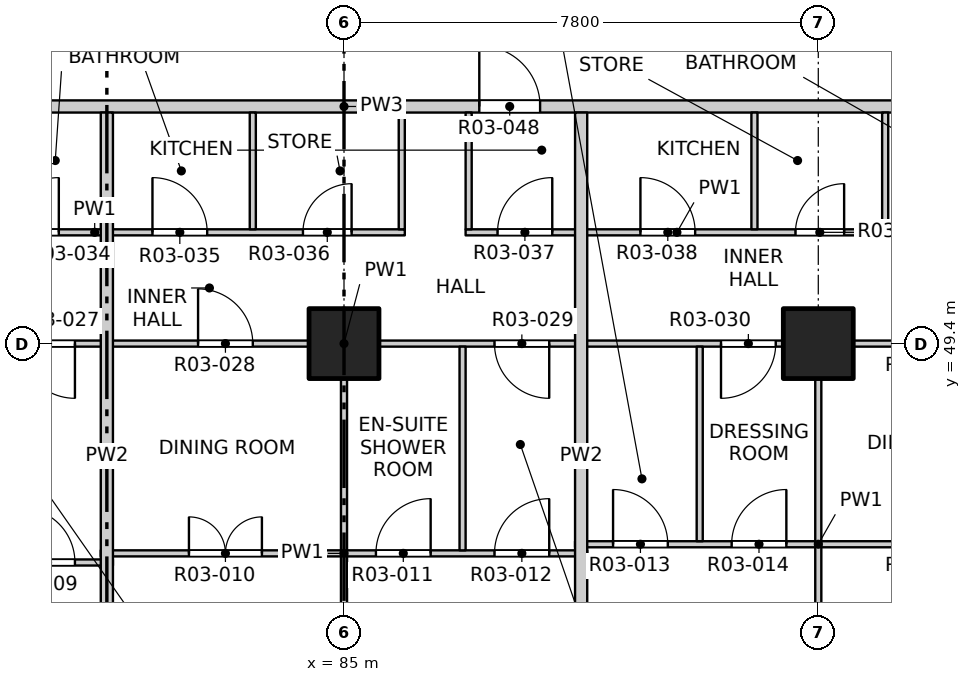
"""IFC4 building model, lengths in metres.
Left out: names, types, materials, properties, quantities, classifications, styles, units other than length and angle.
Written with IfcOpenShell. Run it as: python <this file> out.ifc"""

import sys

from ifc_helpers import new_model, si_unit, direction, frame, frame_2d, origin, origin_2d, place, context, subcontext, project, spatial, rectangle, extrude, element, fill, save


model = new_model("IFC4")
c1 = context("Model", 3, precision=1e-05, world=origin(), true_north=direction((0.0, 1.0)))
c2 = subcontext(c1, "Body", "Model", "MODEL_VIEW")
j1 = project(units=[si_unit("LENGTHUNIT", "METRE"), si_unit("PLANEANGLEUNIT", "RADIAN")], contexts=[c1])
p1 = place(None, origin())
s1 = spatial("IfcSite", under=j1, at=p1, CompositionType="ELEMENT")
p2 = place(p1, origin())
s2 = spatial("IfcBuilding", under=s1, at=p2, CompositionType="ELEMENT")
p3 = place(p2, frame((0.0, 0.0, 39.9)))
s3 = spatial("IfcBuildingStorey", under=s2, at=p3, CompositionType="ELEMENT", Elevation=39.9)
for number, where, z_axis, x_axis in (
    (1, (85.0, 49.4, -0.25), (0.0, 0.0, 1.0), (1.0, 0.0, 0.0)),
    (2, (92.8, 49.4, -0.25), (0.0, 0.0, 1.0), (1.0, 0.0, 0.0)),
):
    element("IfcColumn", number, at=place(p3, frame(where, z_axis=z_axis, x_axis=x_axis)), inside=s3, PredefinedType="COLUMN", context=c2, shape_type="SweptSolid", body=[
        extrude(rectangle(XDim=1.15, YDim=1.15, at=origin_2d()), origin(), (0.0, 0.0, 1.0), 3.4),
    ])
p4 = place(p3, frame((73.2, 45.8, 0.0), z_axis=(0.0, 0.0, 1.0), x_axis=(1.0, 0.0, 0.0)))
e3 = element("IfcWall", 3, at=p4, inside=s3, PredefinedType="PARTITIONING", context=c2, shape_type="SweptSolid", body=[
    extrude(rectangle(XDim=8.0, YDim=0.1, at=frame_2d((4.0, 0.0))), origin(), (0.0, 0.0, 1.0), 3.15),
])
p5 = place(p4, frame((1.45, 0.0, 0.0)))
e4 = element("IfcOpeningElement", 4, at=p5, cuts=e3, PredefinedType="OPENING", context=c2, shape_type="SweptSolid", body=[
    extrude(rectangle(XDim=1.2, YDim=2.1, at=frame_2d((0.6, 1.05))), frame((0.0, 0.06, 0.0), z_axis=(0.0, -1.0, 0.0), x_axis=(1.0, 0.0, 0.0)), (0.0, 0.0, 1.0), 0.12),
])
p6 = place(p4, frame((4.525, 0.0, 0.0)))
e5 = element("IfcOpeningElement", 5, at=p6, cuts=e3, PredefinedType="OPENING", context=c2, shape_type="SweptSolid", body=[
    extrude(rectangle(XDim=0.9, YDim=2.1, at=frame_2d((0.45, 1.05))), frame((0.0, 0.06, 0.0), z_axis=(0.0, -1.0, 0.0), x_axis=(1.0, 0.0, 0.0)), (0.0, 0.0, 1.0), 0.12),
])
p7 = place(p4, frame((6.475, 0.0, 0.0)))
e6 = element("IfcOpeningElement", 6, at=p7, cuts=e3, PredefinedType="OPENING", context=c2, shape_type="SweptSolid", body=[
    extrude(rectangle(XDim=0.9, YDim=2.1, at=frame_2d((0.45, 1.05))), frame((0.0, 0.06, 0.0), z_axis=(0.0, -1.0, 0.0), x_axis=(1.0, 0.0, 0.0)), (0.0, 0.0, 1.0), 0.12),
])
p8 = place(p3, frame((81.0, 45.95, 0.0), z_axis=(0.0, 0.0, 1.0), x_axis=(1.0, 0.0, 0.0)))
e7 = element("IfcWall", 7, at=p8, inside=s3, PredefinedType="PARTITIONING", context=c2, shape_type="SweptSolid", body=[
    extrude(rectangle(XDim=8.0, YDim=0.1, at=frame_2d((4.0, 0.0))), origin(), (0.0, 0.0, 1.0), 3.15),
])
p9 = place(p8, frame((1.45, 0.0, 0.0)))
e8 = element("IfcOpeningElement", 8, at=p9, cuts=e7, PredefinedType="OPENING", context=c2, shape_type="SweptSolid", body=[
    extrude(rectangle(XDim=1.2, YDim=2.1, at=frame_2d((0.6, 1.05))), frame((0.0, 0.06, 0.0), z_axis=(0.0, -1.0, 0.0), x_axis=(1.0, 0.0, 0.0)), (0.0, 0.0, 1.0), 0.12),
])
p10 = place(p8, frame((4.525, 0.0, 0.0)))
e9 = element("IfcOpeningElement", 9, at=p10, cuts=e7, PredefinedType="OPENING", context=c2, shape_type="SweptSolid", body=[
    extrude(rectangle(XDim=0.9, YDim=2.1, at=frame_2d((0.45, 1.05))), frame((0.0, 0.06, 0.0), z_axis=(0.0, -1.0, 0.0), x_axis=(1.0, 0.0, 0.0)), (0.0, 0.0, 1.0), 0.12),
])
p11 = place(p8, frame((6.475, 0.0, 0.0)))
e10 = element("IfcOpeningElement", 10, at=p11, cuts=e7, PredefinedType="OPENING", context=c2, shape_type="SweptSolid", body=[
    extrude(rectangle(XDim=0.9, YDim=2.1, at=frame_2d((0.45, 1.05))), frame((0.0, 0.06, 0.0), z_axis=(0.0, -1.0, 0.0), x_axis=(1.0, 0.0, 0.0)), (0.0, 0.0, 1.0), 0.12),
])
p12 = place(p3, frame((88.8, 46.1, 0.0), z_axis=(0.0, 0.0, 1.0), x_axis=(1.0, 0.0, 0.0)))
e11 = element("IfcWall", 11, at=p12, inside=s3, PredefinedType="PARTITIONING", context=c2, shape_type="SweptSolid", body=[
    extrude(rectangle(XDim=8.0, YDim=0.1, at=frame_2d((4.0, 0.0))), origin(), (0.0, 0.0, 1.0), 3.15),
])
p13 = place(p12, frame((0.625, 0.0, 0.0)))
e12 = element("IfcOpeningElement", 12, at=p13, cuts=e11, PredefinedType="OPENING", context=c2, shape_type="SweptSolid", body=[
    extrude(rectangle(XDim=0.9, YDim=2.1, at=frame_2d((0.45, 1.05))), frame((0.0, 0.06, 0.0), z_axis=(0.0, -1.0, 0.0), x_axis=(1.0, 0.0, 0.0)), (0.0, 0.0, 1.0), 0.12),
])
p14 = place(p12, frame((2.575, 0.0, 0.0)))
e13 = element("IfcOpeningElement", 13, at=p14, cuts=e11, PredefinedType="OPENING", context=c2, shape_type="SweptSolid", body=[
    extrude(rectangle(XDim=0.9, YDim=2.1, at=frame_2d((0.45, 1.05))), frame((0.0, 0.06, 0.0), z_axis=(0.0, -1.0, 0.0), x_axis=(1.0, 0.0, 0.0)), (0.0, 0.0, 1.0), 0.12),
])
p15 = place(p12, frame((5.35, 0.0, 0.0)))
e14 = element("IfcOpeningElement", 14, at=p15, cuts=e11, PredefinedType="OPENING", context=c2, shape_type="SweptSolid", body=[
    extrude(rectangle(XDim=1.2, YDim=2.1, at=frame_2d((0.6, 1.05))), frame((0.0, 0.06, 0.0), z_axis=(0.0, -1.0, 0.0), x_axis=(1.0, 0.0, 0.0)), (0.0, 0.0, 1.0), 0.12),
])
p16 = place(p3, frame((73.2, 49.4, 0.0), z_axis=(0.0, 0.0, 1.0), x_axis=(1.0, 0.0, 0.0)))
e15 = element("IfcWall", 15, at=p16, inside=s3, PredefinedType="PARTITIONING", context=c2, shape_type="SweptSolid", body=[
    extrude(rectangle(XDim=23.6, YDim=0.1, at=frame_2d((11.8, 0.0))), origin(), (0.0, 0.0, 1.0), 3.15),
])
p17 = place(p16, frame((1.6, 0.0, 0.0)))
e16 = element("IfcOpeningElement", 16, at=p17, cuts=e15, PredefinedType="OPENING", context=c2, shape_type="SweptSolid", body=[
    extrude(rectangle(XDim=0.9, YDim=2.1, at=frame_2d((0.45, 1.05))), frame((0.0, 0.06, 0.0), z_axis=(0.0, -1.0, 0.0), x_axis=(1.0, 0.0, 0.0)), (0.0, 0.0, 1.0), 0.12),
])
p18 = place(p16, frame((6.475, 0.0, 0.0)))
e17 = element("IfcOpeningElement", 17, at=p18, cuts=e15, PredefinedType="OPENING", context=c2, shape_type="SweptSolid", body=[
    extrude(rectangle(XDim=0.9, YDim=2.1, at=frame_2d((0.45, 1.05))), frame((0.0, 0.06, 0.0), z_axis=(0.0, -1.0, 0.0), x_axis=(1.0, 0.0, 0.0)), (0.0, 0.0, 1.0), 0.12),
])
p19 = place(p16, frame((9.4, 0.0, 0.0)))
e18 = element("IfcOpeningElement", 18, at=p19, cuts=e15, PredefinedType="OPENING", context=c2, shape_type="SweptSolid", body=[
    extrude(rectangle(XDim=0.9, YDim=2.1, at=frame_2d((0.45, 1.05))), frame((0.0, 0.06, 0.0), z_axis=(0.0, -1.0, 0.0), x_axis=(1.0, 0.0, 0.0)), (0.0, 0.0, 1.0), 0.12),
])
p20 = place(p16, frame((14.275, 0.0, 0.0)))
e19 = element("IfcOpeningElement", 19, at=p20, cuts=e15, PredefinedType="OPENING", context=c2, shape_type="SweptSolid", body=[
    extrude(rectangle(XDim=0.9, YDim=2.1, at=frame_2d((0.45, 1.05))), frame((0.0, 0.06, 0.0), z_axis=(0.0, -1.0, 0.0), x_axis=(1.0, 0.0, 0.0)), (0.0, 0.0, 1.0), 0.12),
])
p21 = place(p16, frame((18.0, 0.0, 0.0)))
e20 = element("IfcOpeningElement", 20, at=p21, cuts=e15, PredefinedType="OPENING", context=c2, shape_type="SweptSolid", body=[
    extrude(rectangle(XDim=0.9, YDim=2.1, at=frame_2d((0.45, 1.05))), frame((0.0, 0.06, 0.0), z_axis=(0.0, -1.0, 0.0), x_axis=(1.0, 0.0, 0.0)), (0.0, 0.0, 1.0), 0.12),
])
p22 = place(p16, frame((21.1, 0.0, 0.0)))
e21 = element("IfcOpeningElement", 21, at=p22, cuts=e15, PredefinedType="OPENING", context=c2, shape_type="SweptSolid", body=[
    extrude(rectangle(XDim=0.9, YDim=2.1, at=frame_2d((0.45, 1.05))), frame((0.0, 0.06, 0.0), z_axis=(0.0, -1.0, 0.0), x_axis=(1.0, 0.0, 0.0)), (0.0, 0.0, 1.0), 0.12),
])
p23 = place(p3, frame((75.8, 51.23, 0.0), z_axis=(0.0, 0.0, 1.0), x_axis=(1.0, 0.0, 0.0)))
e22 = element("IfcWall", 22, at=p23, inside=s3, PredefinedType="PARTITIONING", context=c2, shape_type="SweptSolid", body=[
    extrude(rectangle(XDim=10.2, YDim=0.1, at=frame_2d((5.1, 0.0))), origin(), (0.0, 0.0, 1.0), 3.15),
])
p24 = place(p23, frame((0.985, 0.0, 0.0)))
e23 = element("IfcOpeningElement", 23, at=p24, cuts=e22, PredefinedType="OPENING", context=c2, shape_type="SweptSolid", body=[
    extrude(rectangle(XDim=0.9, YDim=2.1, at=frame_2d((0.45, 1.05))), frame((0.0, 0.06, 0.0), z_axis=(0.0, -1.0, 0.0), x_axis=(1.0, 0.0, 0.0)), (0.0, 0.0, 1.0), 0.12),
])
p25 = place(p23, frame((3.61, 0.0, 0.0)))
e24 = element("IfcOpeningElement", 24, at=p25, cuts=e22, PredefinedType="OPENING", context=c2, shape_type="SweptSolid", body=[
    extrude(rectangle(XDim=0.9, YDim=2.1, at=frame_2d((0.45, 1.05))), frame((0.0, 0.06, 0.0), z_axis=(0.0, -1.0, 0.0), x_axis=(1.0, 0.0, 0.0)), (0.0, 0.0, 1.0), 0.12),
])
p26 = place(p23, frame((6.05, 0.0, 0.0)))
e25 = element("IfcOpeningElement", 25, at=p26, cuts=e22, PredefinedType="OPENING", context=c2, shape_type="SweptSolid", body=[
    extrude(rectangle(XDim=0.9, YDim=2.1, at=frame_2d((0.45, 1.05))), frame((0.0, 0.06, 0.0), z_axis=(0.0, -1.0, 0.0), x_axis=(1.0, 0.0, 0.0)), (0.0, 0.0, 1.0), 0.12),
])
p27 = place(p23, frame((8.525, 0.0, 0.0)))
e26 = element("IfcOpeningElement", 26, at=p27, cuts=e22, PredefinedType="OPENING", context=c2, shape_type="SweptSolid", body=[
    extrude(rectangle(XDim=0.8, YDim=2.1, at=frame_2d((0.4, 1.05))), frame((0.0, 0.06, 0.0), z_axis=(0.0, -1.0, 0.0), x_axis=(1.0, 0.0, 0.0)), (0.0, 0.0, 1.0), 0.12),
])
p28 = place(p3, frame((87.0, 51.23, 0.0), z_axis=(0.0, 0.0, 1.0), x_axis=(1.0, 0.0, 0.0)))
e27 = element("IfcWall", 27, at=p28, inside=s3, PredefinedType="PARTITIONING", context=c2, shape_type="SweptSolid", body=[
    extrude(rectangle(XDim=6.95, YDim=0.1, at=frame_2d((3.475, 0.0))), origin(), (0.0, 0.0, 1.0), 3.15),
])
p29 = place(p28, frame((0.525, 0.0, 0.0)))
e28 = element("IfcOpeningElement", 28, at=p29, cuts=e27, PredefinedType="OPENING", context=c2, shape_type="SweptSolid", body=[
    extrude(rectangle(XDim=0.9, YDim=2.1, at=frame_2d((0.45, 1.05))), frame((0.0, 0.06, 0.0), z_axis=(0.0, -1.0, 0.0), x_axis=(1.0, 0.0, 0.0)), (0.0, 0.0, 1.0), 0.12),
])
p30 = place(p28, frame((2.875, 0.0, 0.0)))
e29 = element("IfcOpeningElement", 29, at=p30, cuts=e27, PredefinedType="OPENING", context=c2, shape_type="SweptSolid", body=[
    extrude(rectangle(XDim=0.9, YDim=2.1, at=frame_2d((0.45, 1.05))), frame((0.0, 0.06, 0.0), z_axis=(0.0, -1.0, 0.0), x_axis=(1.0, 0.0, 0.0)), (0.0, 0.0, 1.0), 0.12),
])
p31 = place(p28, frame((5.425, 0.0, 0.0)))
e30 = element("IfcOpeningElement", 30, at=p31, cuts=e27, PredefinedType="OPENING", context=c2, shape_type="SweptSolid", body=[
    extrude(rectangle(XDim=0.8, YDim=2.1, at=frame_2d((0.4, 1.05))), frame((0.0, 0.06, 0.0), z_axis=(0.0, -1.0, 0.0), x_axis=(1.0, 0.0, 0.0)), (0.0, 0.0, 1.0), 0.12),
])
p32 = place(p3, frame((73.2, 53.3, 0.0), z_axis=(0.0, 0.0, 1.0), x_axis=(1.0, 0.0, 0.0)))
e31 = element("IfcWall", 31, at=p32, inside=s3, PredefinedType="PARTITIONING", context=c2, shape_type="SweptSolid", body=[
    extrude(rectangle(XDim=23.6, YDim=0.2, at=frame_2d((11.8, 0.0))), origin(), (0.0, 0.0, 1.0), 3.15),
])
p33 = place(p32, frame((2.825, 0.0, 0.0)))
e32 = element("IfcOpeningElement", 32, at=p33, cuts=e31, PredefinedType="OPENING", context=c2, shape_type="SweptSolid", body=[
    extrude(rectangle(XDim=1.0, YDim=2.1, at=frame_2d((0.5, 1.05))), frame((0.0, 0.11, 0.0), z_axis=(0.0, -1.0, 0.0), x_axis=(1.0, 0.0, 0.0)), (0.0, 0.0, 1.0), 0.22),
])
p34 = place(p32, frame((14.025, 0.0, 0.0)))
e33 = element("IfcOpeningElement", 33, at=p34, cuts=e31, PredefinedType="OPENING", context=c2, shape_type="SweptSolid", body=[
    extrude(rectangle(XDim=1.0, YDim=2.1, at=frame_2d((0.5, 1.05))), frame((0.0, 0.11, 0.0), z_axis=(0.0, -1.0, 0.0), x_axis=(1.0, 0.0, 0.0)), (0.0, 0.0, 1.0), 0.22),
])
p35 = place(p32, frame((21.975, 0.0, 0.0)))
e34 = element("IfcOpeningElement", 34, at=p35, cuts=e31, PredefinedType="OPENING", context=c2, shape_type="SweptSolid", body=[
    extrude(rectangle(XDim=1.0, YDim=2.1, at=frame_2d((0.5, 1.05))), frame((0.0, 0.11, 0.0), z_axis=(0.0, -1.0, 0.0), x_axis=(1.0, 0.0, 0.0)), (0.0, 0.0, 1.0), 0.22),
])
p36 = place(p3, frame((81.1, 41.9, 0.0), z_axis=(0.0, 0.0, 1.0), x_axis=(0.0, 1.0, 0.0)))
e35 = element("IfcWall", 35, at=p36, inside=s3, PredefinedType="PARTITIONING", context=c2, shape_type="SweptSolid", body=[
    extrude(rectangle(XDim=11.3, YDim=0.2, at=frame_2d((5.65, 0.0))), origin(), (0.0, 0.0, 1.0), 3.15),
])
p37 = place(p3, frame((83.5, 51.28, 0.0), z_axis=(0.0, 0.0, 1.0), x_axis=(0.0, 1.0, 0.0)))
e36 = element("IfcWall", 36, at=p37, inside=s3, PredefinedType="PARTITIONING", context=c2, shape_type="SweptSolid", body=[
    extrude(rectangle(XDim=1.92, YDim=0.1, at=frame_2d((0.96, 0.0))), origin(), (0.0, 0.0, 1.0), 3.15),
])
p38 = place(p3, frame((85.0, 41.9, 0.0), z_axis=(0.0, 0.0, 1.0), x_axis=(0.0, 1.0, 0.0)))
e37 = element("IfcWall", 37, at=p38, inside=s3, PredefinedType="PARTITIONING", context=c2, shape_type="SweptSolid", body=[
    extrude(rectangle(XDim=7.45, YDim=0.1, at=frame_2d((3.725, 0.0))), origin(), (0.0, 0.0, 1.0), 2.55),
])
p39 = place(p3, frame((85.95, 51.28, 0.0), z_axis=(0.0, 0.0, 1.0), x_axis=(0.0, 1.0, 0.0)))
e38 = element("IfcWall", 38, at=p39, inside=s3, PredefinedType="PARTITIONING", context=c2, shape_type="SweptSolid", body=[
    extrude(rectangle(XDim=1.92, YDim=0.1, at=frame_2d((0.96, 0.0))), origin(), (0.0, 0.0, 1.0), 3.15),
])
p40 = place(p3, frame((86.95, 46.0, 0.0), z_axis=(0.0, 0.0, 1.0), x_axis=(0.0, 1.0, 0.0)))
e39 = element("IfcWall", 39, at=p40, inside=s3, PredefinedType="PARTITIONING", context=c2, shape_type="SweptSolid", body=[
    extrude(rectangle(XDim=3.35, YDim=0.1, at=frame_2d((1.675, 0.0))), origin(), (0.0, 0.0, 1.0), 3.15),
])
p41 = place(p3, frame((87.05, 51.28, 0.0), z_axis=(0.0, 0.0, 1.0), x_axis=(0.0, 1.0, 0.0)))
e40 = element("IfcWall", 40, at=p41, inside=s3, PredefinedType="PARTITIONING", context=c2, shape_type="SweptSolid", body=[
    extrude(rectangle(XDim=1.92, YDim=0.1, at=frame_2d((0.96, 0.0))), origin(), (0.0, 0.0, 1.0), 3.15),
])
p42 = place(p3, frame((88.9, 41.9, 0.0), z_axis=(0.0, 0.0, 1.0), x_axis=(0.0, 1.0, 0.0)))
e41 = element("IfcWall", 41, at=p42, inside=s3, PredefinedType="PARTITIONING", context=c2, shape_type="SweptSolid", body=[
    extrude(rectangle(XDim=11.3, YDim=0.2, at=frame_2d((5.65, 0.0))), origin(), (0.0, 0.0, 1.0), 3.15),
])
p43 = place(p3, frame((90.85, 46.15, 0.0), z_axis=(0.0, 0.0, 1.0), x_axis=(0.0, 1.0, 0.0)))
e42 = element("IfcWall", 42, at=p43, inside=s3, PredefinedType="PARTITIONING", context=c2, shape_type="SweptSolid", body=[
    extrude(rectangle(XDim=3.2, YDim=0.1, at=frame_2d((1.6, 0.0))), origin(), (0.0, 0.0, 1.0), 3.15),
])
p44 = place(p3, frame((91.75, 51.28, 0.0), z_axis=(0.0, 0.0, 1.0), x_axis=(0.0, 1.0, 0.0)))
e43 = element("IfcWall", 43, at=p44, inside=s3, PredefinedType="PARTITIONING", context=c2, shape_type="SweptSolid", body=[
    extrude(rectangle(XDim=1.92, YDim=0.1, at=frame_2d((0.96, 0.0))), origin(), (0.0, 0.0, 1.0), 3.15),
])
p45 = place(p3, frame((92.8, 41.9, 0.0), z_axis=(0.0, 0.0, 1.0), x_axis=(0.0, 1.0, 0.0)))
e44 = element("IfcWall", 44, at=p45, inside=s3, PredefinedType="PARTITIONING", context=c2, shape_type="SweptSolid", body=[
    extrude(rectangle(XDim=7.45, YDim=0.1, at=frame_2d((3.725, 0.0))), origin(), (0.0, 0.0, 1.0), 2.55),
])
p46 = place(p3, frame((93.9, 51.28, 0.0), z_axis=(0.0, 0.0, 1.0), x_axis=(0.0, 1.0, 0.0)))
e45 = element("IfcWall", 45, at=p46, inside=s3, PredefinedType="PARTITIONING", context=c2, shape_type="SweptSolid", body=[
    extrude(rectangle(XDim=1.92, YDim=0.1, at=frame_2d((0.96, 0.0))), origin(), (0.0, 0.0, 1.0), 3.15),
])
p47 = place(p7, origin())
e46 = element("IfcDoor", 46, at=p47, inside=s3, OperationType="SINGLE_SWING_LEFT", PredefinedType="DOOR", context=c2, shape_type="SweptSolid", body=[
    extrude(rectangle(XDim=0.9, YDim=2.1, at=frame_2d((0.45, 1.05))), frame((0.0, 0.025, 0.0), z_axis=(0.0, -1.0, 0.0), x_axis=(1.0, 0.0, 0.0)), (0.0, 0.0, 1.0), 0.05),
])
fill(e6, e46)
p48 = place(p9, origin())
e47 = element("IfcDoor", 47, at=p48, inside=s3, OperationType="DOUBLE_DOOR_SINGLE_SWING", PredefinedType="DOOR", context=c2, shape_type="SweptSolid", body=[
    extrude(rectangle(XDim=1.2, YDim=2.1, at=frame_2d((0.6, 1.05))), frame((0.0, 0.025, 0.0), z_axis=(0.0, -1.0, 0.0), x_axis=(1.0, 0.0, 0.0)), (0.0, 0.0, 1.0), 0.05),
])
fill(e8, e47)
p49 = place(p10, origin())
e48 = element("IfcDoor", 48, at=p49, inside=s3, OperationType="SINGLE_SWING_RIGHT", PredefinedType="DOOR", context=c2, shape_type="SweptSolid", body=[
    extrude(rectangle(XDim=0.9, YDim=2.1, at=frame_2d((0.45, 1.05))), frame((0.0, 0.025, 0.0), z_axis=(0.0, -1.0, 0.0), x_axis=(1.0, 0.0, 0.0)), (0.0, 0.0, 1.0), 0.05),
])
fill(e9, e48)
p50 = place(p11, origin())
e49 = element("IfcDoor", 49, at=p50, inside=s3, OperationType="SINGLE_SWING_RIGHT", PredefinedType="DOOR", context=c2, shape_type="SweptSolid", body=[
    extrude(rectangle(XDim=0.9, YDim=2.1, at=frame_2d((0.45, 1.05))), frame((0.0, 0.025, 0.0), z_axis=(0.0, -1.0, 0.0), x_axis=(1.0, 0.0, 0.0)), (0.0, 0.0, 1.0), 0.05),
])
fill(e10, e49)
p51 = place(p13, origin())
e50 = element("IfcDoor", 50, at=p51, inside=s3, OperationType="SINGLE_SWING_LEFT", PredefinedType="DOOR", context=c2, shape_type="SweptSolid", body=[
    extrude(rectangle(XDim=0.9, YDim=2.1, at=frame_2d((0.45, 1.05))), frame((0.0, 0.025, 0.0), z_axis=(0.0, -1.0, 0.0), x_axis=(1.0, 0.0, 0.0)), (0.0, 0.0, 1.0), 0.05),
])
fill(e12, e50)
p52 = place(p14, origin())
e51 = element("IfcDoor", 51, at=p52, inside=s3, OperationType="SINGLE_SWING_RIGHT", PredefinedType="DOOR", context=c2, shape_type="SweptSolid", body=[
    extrude(rectangle(XDim=0.9, YDim=2.1, at=frame_2d((0.45, 1.05))), frame((0.0, 0.025, 0.0), z_axis=(0.0, -1.0, 0.0), x_axis=(1.0, 0.0, 0.0)), (0.0, 0.0, 1.0), 0.05),
])
fill(e13, e51)
p53 = place(p18, origin())
e52 = element("IfcDoor", 52, at=p53, inside=s3, OperationType="SINGLE_SWING_LEFT", PredefinedType="DOOR", context=c2, shape_type="SweptSolid", body=[
    extrude(rectangle(XDim=0.9, YDim=2.1, at=frame_2d((0.45, 1.05))), frame((0.0, 0.025, 0.0), z_axis=(0.0, -1.0, 0.0), x_axis=(1.0, 0.0, 0.0)), (0.0, 0.0, 1.0), 0.05),
])
fill(e17, e52)
p54 = place(p19, origin())
e53 = element("IfcDoor", 53, at=p54, inside=s3, OperationType="SINGLE_SWING_LEFT", PredefinedType="DOOR", context=c2, shape_type="SweptSolid", body=[
    extrude(rectangle(XDim=0.9, YDim=2.1, at=frame_2d((0.45, 1.05))), frame((0.0, 0.025, 0.0), z_axis=(0.0, -1.0, 0.0), x_axis=(1.0, 0.0, 0.0)), (0.0, 0.0, 1.0), 0.05),
])
fill(e18, e53)
p55 = place(p20, origin())
e54 = element("IfcDoor", 54, at=p55, inside=s3, OperationType="SINGLE_SWING_LEFT", PredefinedType="DOOR", context=c2, shape_type="SweptSolid", body=[
    extrude(rectangle(XDim=0.9, YDim=2.1, at=frame_2d((0.45, 1.05))), frame((0.0, 0.025, 0.0), z_axis=(0.0, -1.0, 0.0), x_axis=(1.0, 0.0, 0.0)), (0.0, 0.0, 1.0), 0.05),
])
fill(e19, e54)
p56 = place(p21, origin())
e55 = element("IfcDoor", 55, at=p56, inside=s3, OperationType="SINGLE_SWING_RIGHT", PredefinedType="DOOR", context=c2, shape_type="SweptSolid", body=[
    extrude(rectangle(XDim=0.9, YDim=2.1, at=frame_2d((0.45, 1.05))), frame((0.0, 0.025, 0.0), z_axis=(0.0, -1.0, 0.0), x_axis=(1.0, 0.0, 0.0)), (0.0, 0.0, 1.0), 0.05),
])
fill(e20, e55)
p57 = place(p25, origin())
e56 = element("IfcDoor", 56, at=p57, inside=s3, OperationType="SINGLE_SWING_RIGHT", PredefinedType="DOOR", context=c2, shape_type="SweptSolid", body=[
    extrude(rectangle(XDim=0.9, YDim=2.1, at=frame_2d((0.45, 1.05))), frame((0.0, 0.025, 0.0), z_axis=(0.0, -1.0, 0.0), x_axis=(1.0, 0.0, 0.0)), (0.0, 0.0, 1.0), 0.05),
])
fill(e24, e56)
p58 = place(p26, origin())
e57 = element("IfcDoor", 57, at=p58, inside=s3, OperationType="SINGLE_SWING_LEFT", PredefinedType="DOOR", context=c2, shape_type="SweptSolid", body=[
    extrude(rectangle(XDim=0.9, YDim=2.1, at=frame_2d((0.45, 1.05))), frame((0.0, 0.025, 0.0), z_axis=(0.0, -1.0, 0.0), x_axis=(1.0, 0.0, 0.0)), (0.0, 0.0, 1.0), 0.05),
])
fill(e25, e57)
p59 = place(p27, origin())
e58 = element("IfcDoor", 58, at=p59, inside=s3, OperationType="SINGLE_SWING_RIGHT", PredefinedType="DOOR", context=c2, shape_type="SweptSolid", body=[
    extrude(rectangle(XDim=0.8, YDim=2.1, at=frame_2d((0.4, 1.05))), frame((0.0, 0.025, 0.0), z_axis=(0.0, -1.0, 0.0), x_axis=(1.0, 0.0, 0.0)), (0.0, 0.0, 1.0), 0.05),
])
fill(e26, e58)
p60 = place(p29, origin())
e59 = element("IfcDoor", 59, at=p60, inside=s3, OperationType="SINGLE_SWING_RIGHT", PredefinedType="DOOR", context=c2, shape_type="SweptSolid", body=[
    extrude(rectangle(XDim=0.9, YDim=2.1, at=frame_2d((0.45, 1.05))), frame((0.0, 0.025, 0.0), z_axis=(0.0, -1.0, 0.0), x_axis=(1.0, 0.0, 0.0)), (0.0, 0.0, 1.0), 0.05),
])
fill(e28, e59)
p61 = place(p30, origin())
e60 = element("IfcDoor", 60, at=p61, inside=s3, OperationType="SINGLE_SWING_LEFT", PredefinedType="DOOR", context=c2, shape_type="SweptSolid", body=[
    extrude(rectangle(XDim=0.9, YDim=2.1, at=frame_2d((0.45, 1.05))), frame((0.0, 0.025, 0.0), z_axis=(0.0, -1.0, 0.0), x_axis=(1.0, 0.0, 0.0)), (0.0, 0.0, 1.0), 0.05),
])
fill(e29, e60)
p62 = place(p31, origin())
e61 = element("IfcDoor", 61, at=p62, inside=s3, OperationType="SINGLE_SWING_RIGHT", PredefinedType="DOOR", context=c2, shape_type="SweptSolid", body=[
    extrude(rectangle(XDim=0.8, YDim=2.1, at=frame_2d((0.4, 1.05))), frame((0.0, 0.025, 0.0), z_axis=(0.0, -1.0, 0.0), x_axis=(1.0, 0.0, 0.0)), (0.0, 0.0, 1.0), 0.05),
])
fill(e30, e61)
p63 = place(p34, origin())
e62 = element("IfcDoor", 62, at=p63, inside=s3, OperationType="SINGLE_SWING_LEFT", PredefinedType="DOOR", context=c2, shape_type="SweptSolid", body=[
    extrude(rectangle(XDim=1.0, YDim=2.1, at=frame_2d((0.5, 1.05))), frame((0.0, 0.025, 0.0), z_axis=(0.0, -1.0, 0.0), x_axis=(1.0, 0.0, 0.0)), (0.0, 0.0, 1.0), 0.05),
])
fill(e33, e62)
save(model, sys.argv[1])
